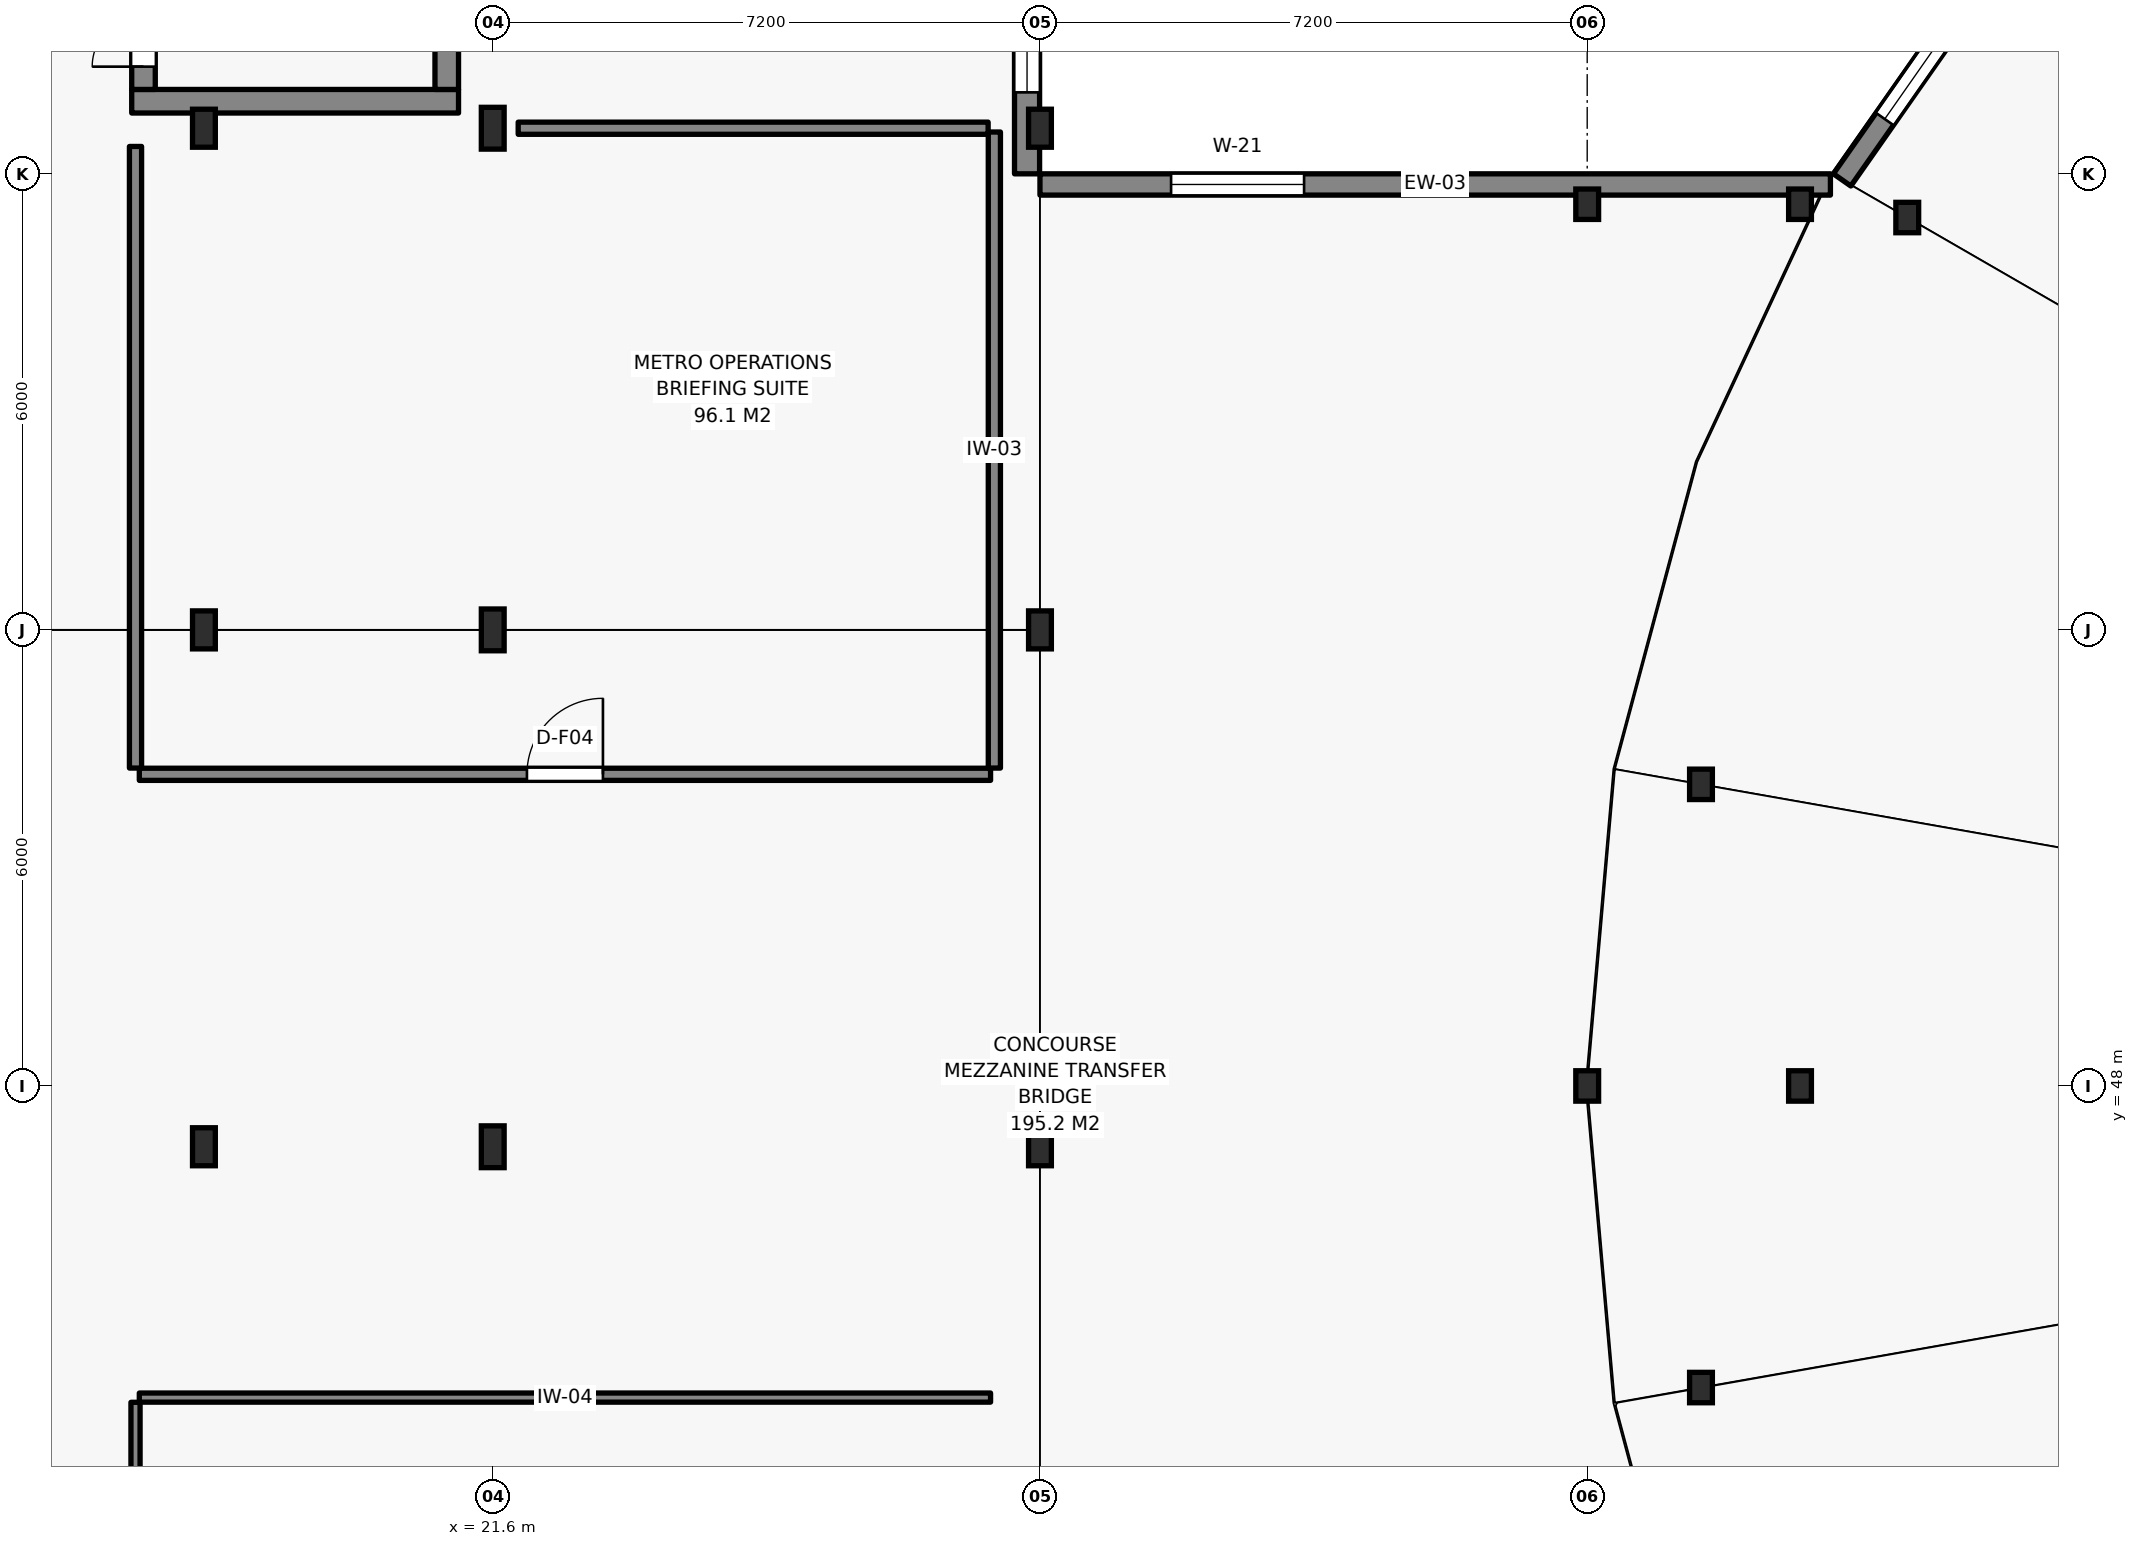
"""IFC4 building model, lengths in metres.
Left out: names, types, materials, properties, quantities, classifications, styles, units other than length and angle.
Written with IfcOpenShell. Run it as: python <this file> out.ifc"""

import sys

from ifc_helpers import new_model, si_unit, direction, frame, frame_2d, origin, origin_2d, place, context, subcontext, project, spatial, rectangle, i_section, extrude, element, fill, save


model = new_model("IFC4")
c1 = context("Model", 3, precision=1e-05, world=origin(), true_north=direction((0.0, 1.0)))
c2 = subcontext(c1, "Body", "Model", "MODEL_VIEW")
j1 = project(units=[si_unit("LENGTHUNIT", "METRE"), si_unit("PLANEANGLEUNIT", "RADIAN")], contexts=[c1])
p1 = place(None, origin())
s1 = spatial("IfcSite", under=j1, at=p1, CompositionType="ELEMENT")
p2 = place(p1, origin())
s2 = spatial("IfcBuilding", under=s1, at=p2, CompositionType="ELEMENT")
p3 = place(p2, frame((0.0, 0.0, 6.0)))
s3 = spatial("IfcBuildingStorey", under=s2, at=p3, CompositionType="ELEMENT", Elevation=6.0)
p4 = place(p3, frame((16.85, 60.955, 0.0), z_axis=(0.0, 0.0, 1.0), x_axis=(1.0, 0.0, 0.0)))
e1 = element("IfcWall", 1, at=p4, inside=s3, PredefinedType="SHEAR", context=c2, shape_type="SweptSolid", body=[
    extrude(rectangle(XDim=4.3, YDim=0.31, at=frame_2d((2.15, 0.0))), origin(), (0.0, 0.0, 1.0), 4.25),
])
p5 = place(p3, frame((17.005, 61.11, 0.0), z_axis=(0.0, 0.0, 1.0), x_axis=(0.0, 1.0, 0.0)))
e2 = element("IfcWall", 2, at=p5, inside=s3, PredefinedType="SHEAR", context=c2, shape_type="SweptSolid", body=[
    extrude(rectangle(XDim=9.58, YDim=0.31, at=frame_2d((4.79, 0.0))), origin(), (0.0, 0.0, 1.0), 4.25),
])
p6 = place(p5, frame((0.3, 0.0, 0.0)))
e3 = element("IfcOpeningElement", 3, at=p6, cuts=e2, PredefinedType="OPENING", context=c2, shape_type="SweptSolid", body=[
    extrude(rectangle(XDim=1.35, YDim=2.15, at=frame_2d((0.675, 1.075))), frame((0.0, 0.165, 0.0), z_axis=(0.0, -1.0, 0.0), x_axis=(1.0, 0.0, 0.0)), (0.0, 0.0, 1.0), 0.33),
])
p7 = place(p3, frame((20.995, 61.11, 0.0), z_axis=(0.0, 0.0, 1.0), x_axis=(0.0, 1.0, 0.0)))
e4 = element("IfcWall", 4, at=p7, inside=s3, PredefinedType="SHEAR", context=c2, shape_type="SweptSolid", body=[
    extrude(rectangle(XDim=9.58, YDim=0.31, at=frame_2d((4.79, 0.0))), origin(), (0.0, 0.0, 1.0), 4.25),
])
for number, where, z_axis, x_axis in (
    (5, (17.8, 47.2, 0.0), (0.0, 0.0, 1.0), (1.0, 0.0, 0.0)),
    (6, (17.8, 54.0, 0.0), (0.0, 0.0, 1.0), (1.0, 0.0, 0.0)),
    (7, (17.8, 60.6, 0.0), (0.0, 0.0, 1.0), (1.0, 0.0, 0.0)),
):
    element("IfcColumn", number, at=place(p3, frame(where, z_axis=z_axis, x_axis=x_axis)), inside=s3, PredefinedType="COLUMN", context=c2, shape_type="SweptSolid", body=[
        extrude(i_section(OverallWidth=0.3, OverallDepth=0.5, WebThickness=0.014, FlangeThickness=0.028, FilletRadius=0.027, at=origin_2d()), origin(), (0.0, 0.0, 1.0), 4.5),
    ])
for number, where, z_axis, x_axis in (
    (8, (21.6, 47.2, 0.0), (0.0, 0.0, 1.0), (1.0, 0.0, 0.0)),
    (9, (21.6, 54.0, 0.0), (0.0, 0.0, 1.0), (1.0, 0.0, 0.0)),
    (10, (21.6, 60.6, 0.0), (0.0, 0.0, 1.0), (1.0, 0.0, 0.0)),
):
    element("IfcColumn", number, at=place(p3, frame(where, z_axis=z_axis, x_axis=x_axis)), inside=s3, PredefinedType="COLUMN", context=c2, shape_type="SweptSolid", body=[
        extrude(i_section(OverallWidth=0.3, OverallDepth=0.55, WebThickness=0.015, FlangeThickness=0.029, FilletRadius=0.027, at=origin_2d()), origin(), (0.0, 0.0, 1.0), 4.5),
    ])
for number, where, z_axis, x_axis in (
    (11, (28.8, 47.2, 0.0), (0.0, 0.0, 1.0), (1.0, 0.0, 0.0)),
    (12, (28.8, 54.0, 0.0), (0.0, 0.0, 1.0), (1.0, 0.0, 0.0)),
    (13, (28.8, 60.6, 0.0), (0.0, 0.0, 1.0), (1.0, 0.0, 0.0)),
):
    element("IfcColumn", number, at=place(p3, frame(where, z_axis=z_axis, x_axis=x_axis)), inside=s3, PredefinedType="COLUMN", context=c2, shape_type="SweptSolid", body=[
        extrude(i_section(OverallWidth=0.3, OverallDepth=0.5, WebThickness=0.014, FlangeThickness=0.028, FilletRadius=0.027, at=origin_2d()), origin(), (0.0, 0.0, 1.0), 4.5),
    ])
for number, where, z_axis, x_axis in (
    (14, (36.0, 48.0, 0.0), (0.0, 0.0, 1.0), (1.0, 0.0, 0.0)),
    (15, (36.0, 59.6, 0.0), (0.0, 0.0, 1.0), (1.0, 0.0, 0.0)),
    (16, (38.8, 48.0, 0.0), (0.0, 0.0, 1.0), (1.0, 0.0, 0.0)),
    (17, (38.8, 59.6, 0.0), (0.0, 0.0, 1.0), (1.0, 0.0, 0.0)),
    (18, (40.211, 59.425, 0.0), (0.0, 0.0, 1.0), (1.0, 0.0, 0.0)),
    (19, (37.497, 51.968, 0.0), (0.0, 0.0, 1.0), (1.0, 0.0, 0.0)),
    (20, (37.497, 44.032, 0.0), (0.0, 0.0, 1.0), (1.0, 0.0, 0.0)),
):
    element("IfcColumn", number, at=place(p3, frame(where, z_axis=z_axis, x_axis=x_axis)), inside=s3, PredefinedType="COLUMN", context=c2, shape_type="SweptSolid", body=[
        extrude(i_section(OverallWidth=0.3, OverallDepth=0.4, WebThickness=0.013, FlangeThickness=0.024, FilletRadius=0.027, at=origin_2d()), origin(), (0.0, 0.0, 1.0), 4.5),
    ])
p8 = place(p3, frame((28.63, 60.0, 0.0), z_axis=(0.0, 0.0, 1.0), x_axis=(0.0, 1.0, 0.0)))
e21 = element("IfcWall", 21, at=p8, inside=s3, PredefinedType="SOLIDWALL", context=c2, shape_type="SweptSolid", body=[
    extrude(rectangle(XDim=23.66, YDim=0.33, at=frame_2d((11.83, 0.0))), origin(), (0.0, 0.0, 1.0), 3.845),
])
p9 = place(p8, frame((1.072, 0.0, 0.82)))
e22 = element("IfcOpeningElement", 22, at=p9, cuts=e21, PredefinedType="OPENING", context=c2, shape_type="SweptSolid", body=[
    extrude(rectangle(XDim=1.8, YDim=2.35, at=frame_2d((0.9, 1.175))), frame((0.0, 0.175, 0.0), z_axis=(0.0, -1.0, 0.0), x_axis=(1.0, 0.0, 0.0)), (0.0, 0.0, 1.0), 0.35),
])
p10 = place(p8, frame((20.788, 0.0, 0.82)))
e23 = element("IfcOpeningElement", 23, at=p10, cuts=e21, PredefinedType="OPENING", context=c2, shape_type="SweptSolid", body=[
    extrude(rectangle(XDim=1.8, YDim=2.35, at=frame_2d((0.9, 1.175))), frame((0.0, 0.175, 0.0), z_axis=(0.0, -1.0, 0.0), x_axis=(1.0, 0.0, 0.0)), (0.0, 0.0, 1.0), 0.35),
])
p11 = place(p3, frame((39.2, 59.86, 0.0), z_axis=(0.0, 0.0, 1.0), x_axis=(-1.0, 0.0, 0.0)))
e24 = element("IfcWall", 24, at=p11, inside=s3, PredefinedType="SOLIDWALL", context=c2, shape_type="SweptSolid", body=[
    extrude(rectangle(XDim=10.4, YDim=0.28, at=frame_2d((5.2, 0.0))), origin(), (0.0, 0.0, 1.0), 3.845),
])
p12 = place(p11, frame((6.925, 0.0, 0.85)))
e25 = element("IfcOpeningElement", 25, at=p12, cuts=e24, PredefinedType="OPENING", context=c2, shape_type="SweptSolid", body=[
    extrude(rectangle(XDim=1.75, YDim=2.15, at=frame_2d((0.875, 1.075))), frame((0.0, 0.15, 0.0), z_axis=(0.0, -1.0, 0.0), x_axis=(1.0, 0.0, 0.0)), (0.0, 0.0, 1.0), 0.3),
])
p13 = place(p3, frame((41.738, 63.324, 0.0), z_axis=(0.0, 0.0, 1.0), x_axis=(-0.573549082007, -0.819171197327, 0.0)))
e26 = element("IfcWall", 26, at=p13, inside=s3, PredefinedType="SOLIDWALL", context=c2, shape_type="SweptSolid", body=[
    extrude(rectangle(XDim=4.156, YDim=0.28, at=frame_2d((2.078, 0.0))), origin(), (0.0, 0.0, 1.0), 4.25),
])
p14 = place(p13, frame((0.978, 0.0, 0.85)))
e27 = element("IfcOpeningElement", 27, at=p14, cuts=e26, PredefinedType="OPENING", context=c2, shape_type="SweptSolid", body=[
    extrude(rectangle(XDim=2.2, YDim=2.45, at=frame_2d((1.1, 1.225))), frame((0.0, 0.15, 0.0), z_axis=(0.0, -1.0, 0.0), x_axis=(1.0, 0.0, 0.0)), (0.0, 0.0, 1.0), 0.3),
])
p15 = place(p3, frame((28.15, 43.9, 0.0), z_axis=(0.0, 0.0, 1.0), x_axis=(-1.0, 0.0, 0.0)))
e28 = element("IfcWall", 28, at=p15, inside=s3, PredefinedType="PARTITIONING", context=c2, shape_type="SweptSolid", body=[
    extrude(rectangle(XDim=11.2, YDim=0.12, at=frame_2d((5.6, 0.0))), origin(), (0.0, 0.0, 1.0), 3.875),
])
p16 = place(p3, frame((16.9, 43.838, 0.0), z_axis=(0.0, 0.0, 1.0), x_axis=(0.0, -1.0, 0.0)))
e29 = element("IfcWall", 29, at=p16, inside=s3, PredefinedType="PARTITIONING", context=c2, shape_type="SweptSolid", body=[
    extrude(rectangle(XDim=23.126, YDim=0.12, at=frame_2d((11.563, 0.0))), origin(), (0.0, 0.0, 1.0), 3.985),
])
p17 = place(p3, frame((16.95, 52.1, 0.0), z_axis=(0.0, 0.0, 1.0), x_axis=(1.0, 0.0, 0.0)))
e30 = element("IfcWall", 30, at=p17, inside=s3, PredefinedType="PARTITIONING", context=c2, shape_type="SweptSolid", body=[
    extrude(rectangle(XDim=11.2, YDim=0.16, at=frame_2d((5.6, 0.0))), origin(), (0.0, 0.0, 1.0), 3.845),
])
p18 = place(p17, frame((5.1, 0.0, 0.0)))
e31 = element("IfcOpeningElement", 31, at=p18, cuts=e30, PredefinedType="OPENING", context=c2, shape_type="SweptSolid", body=[
    extrude(rectangle(XDim=1.0, YDim=2.15, at=frame_2d((0.5, 1.075))), frame((0.0, 0.09, 0.0), z_axis=(0.0, -1.0, 0.0), x_axis=(1.0, 0.0, 0.0)), (0.0, 0.0, 1.0), 0.18),
])
p19 = place(p3, frame((28.2, 52.182, 0.0), z_axis=(0.0, 0.0, 1.0), x_axis=(0.0, 1.0, 0.0)))
e32 = element("IfcWall", 32, at=p19, inside=s3, PredefinedType="PARTITIONING", context=c2, shape_type="SweptSolid", body=[
    extrude(rectangle(XDim=8.368, YDim=0.16, at=frame_2d((4.184, 0.0))), origin(), (0.0, 0.0, 1.0), 3.795),
])
p20 = place(p3, frame((28.118, 60.6, 0.0), z_axis=(0.0, 0.0, 1.0), x_axis=(-1.0, 0.0, 0.0)))
e33 = element("IfcWall", 33, at=p20, inside=s3, PredefinedType="PARTITIONING", context=c2, shape_type="SweptSolid", body=[
    extrude(rectangle(XDim=6.183, YDim=0.16, at=frame_2d((3.091, 0.0))), origin(), (0.0, 0.0, 1.0), 3.795),
])
p21 = place(p3, frame((16.9, 60.36, 0.0), z_axis=(0.0, 0.0, 1.0), x_axis=(0.0, -1.0, 0.0)))
e34 = element("IfcWall", 34, at=p21, inside=s3, PredefinedType="PARTITIONING", context=c2, shape_type="SweptSolid", body=[
    extrude(rectangle(XDim=8.178, YDim=0.16, at=frame_2d((4.089, 0.0))), origin(), (0.0, 0.0, 1.0), 4.16),
])
p22 = place(p9, origin())
e35 = element("IfcWindow", 35, at=p22, inside=s3, PartitioningType="SINGLE_PANEL", PredefinedType="WINDOW", context=c2, shape_type="SweptSolid", body=[
    extrude(rectangle(XDim=1.8, YDim=2.35, at=frame_2d((0.9, 1.175))), frame((0.0, 0.03, 0.0), z_axis=(0.0, -1.0, 0.0), x_axis=(1.0, 0.0, 0.0)), (0.0, 0.0, 1.0), 0.06),
])
fill(e22, e35)
p23 = place(p12, origin())
e36 = element("IfcWindow", 36, at=p23, inside=s3, PartitioningType="SINGLE_PANEL", PredefinedType="WINDOW", context=c2, shape_type="SweptSolid", body=[
    extrude(rectangle(XDim=1.75, YDim=2.15, at=frame_2d((0.875, 1.075))), frame((0.0, 0.03, 0.0), z_axis=(0.0, -1.0, 0.0), x_axis=(1.0, 0.0, 0.0)), (0.0, 0.0, 1.0), 0.06),
])
fill(e25, e36)
p24 = place(p14, origin())
e37 = element("IfcWindow", 37, at=p24, inside=s3, PartitioningType="SINGLE_PANEL", PredefinedType="WINDOW", context=c2, shape_type="SweptSolid", body=[
    extrude(rectangle(XDim=2.2, YDim=2.45, at=frame_2d((1.1, 1.225))), frame((0.0, 0.03, 0.0), z_axis=(0.0, -1.0, 0.0), x_axis=(1.0, 0.0, 0.0)), (0.0, 0.0, 1.0), 0.06),
])
fill(e27, e37)
p25 = place(p6, origin())
e38 = element("IfcDoor", 38, at=p25, inside=s3, OperationType="DOUBLE_DOOR_SINGLE_SWING", PredefinedType="DOOR", context=c2, shape_type="SweptSolid", body=[
    extrude(rectangle(XDim=1.35, YDim=2.15, at=frame_2d((0.675, 1.075))), frame((0.0, 0.025, 0.0), z_axis=(0.0, -1.0, 0.0), x_axis=(1.0, 0.0, 0.0)), (0.0, 0.0, 1.0), 0.05),
])
fill(e3, e38)
p26 = place(p18, origin())
e39 = element("IfcDoor", 39, at=p26, inside=s3, OperationType="SINGLE_SWING_RIGHT", PredefinedType="DOOR", context=c2, shape_type="SweptSolid", body=[
    extrude(rectangle(XDim=1.0, YDim=2.15, at=frame_2d((0.5, 1.075))), frame((0.0, 0.025, 0.0), z_axis=(0.0, -1.0, 0.0), x_axis=(1.0, 0.0, 0.0)), (0.0, 0.0, 1.0), 0.05),
])
fill(e31, e39)
save(model, sys.argv[1])
